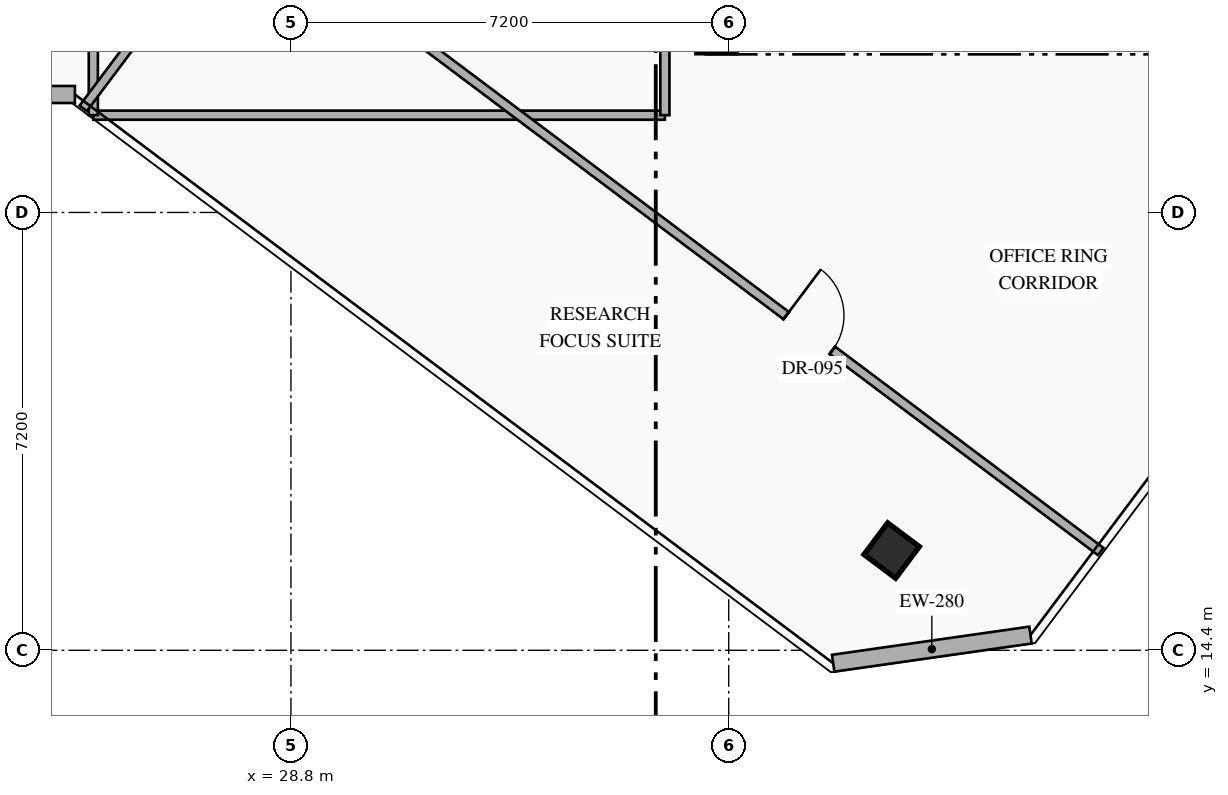
"""IFC4 building model, lengths in metres.
Left out: names, types, materials, properties, quantities, classifications, styles, units other than length and angle.
Written with IfcOpenShell. Run it as: python <this file> out.ifc"""

import sys

from ifc_helpers import new_model, si_unit, direction, frame, frame_2d, origin, origin_2d, place, context, subcontext, project, spatial, rectangle, hollow_rectangle, extrude, element, fill, save


model = new_model("IFC4")
c1 = context("Model", 3, precision=1e-05, world=origin(), true_north=direction((0.0, 1.0)))
c2 = subcontext(c1, "Body", "Model", "MODEL_VIEW")
j1 = project(units=[si_unit("LENGTHUNIT", "METRE"), si_unit("PLANEANGLEUNIT", "RADIAN")], contexts=[c1])
p1 = place(None, origin())
s1 = spatial("IfcSite", under=j1, at=p1, CompositionType="ELEMENT")
p2 = place(p1, origin())
s2 = spatial("IfcBuilding", under=s1, at=p2, CompositionType="ELEMENT")
p3 = place(p2, frame((0.0, 0.0, 239.55)))
s3 = spatial("IfcBuildingStorey", under=s2, at=p3, CompositionType="ELEMENT", Elevation=239.55)
for number, where, z_axis, x_axis in (
    (1, (35.8, 24.55, 0.0), (0.0, 0.0, 1.0), (1.0, 0.0, 0.0)),
    (2, (38.68, 16.04, 0.0), (0.0, 0.0, 1.0), (0.8, -0.6, 0.0)),
):
    element("IfcColumn", number, at=place(p3, frame(where, z_axis=z_axis, x_axis=x_axis)), inside=s3, PredefinedType="COLUMN", context=c2, shape_type="SweptSolid", body=[
        extrude(hollow_rectangle(XDim=0.65, YDim=0.65, WallThickness=0.025, at=origin_2d()), origin(), (0.0, 0.0, 1.0), 3.6),
    ])
p4 = place(p3, frame((40.963, 14.65, 0.0), z_axis=(0.0, 0.0, 1.0), x_axis=(-0.989977778067, -0.141223223777, 0.0)))
e3 = element("IfcWall", 3, at=p4, inside=s3, PredefinedType="STANDARD", context=c2, shape_type="SweptSolid", body=[
    extrude(rectangle(XDim=3.278, YDim=0.28, at=frame_2d((1.639, 0.0))), origin(), (0.0, 0.0, 1.0), 3.35),
])
p5 = place(p3, frame((25.247, 23.54, 0.0), z_axis=(0.0, 0.0, 1.0), x_axis=(-1.0, 0.0, 0.0)))
e4 = element("IfcWall", 4, at=p5, inside=s3, PredefinedType="STANDARD", context=c2, shape_type="SweptSolid", body=[
    extrude(rectangle(XDim=4.789, YDim=0.28, at=frame_2d((2.395, 0.0))), origin(), (0.0, 0.0, 1.0), 3.35),
])
p6 = place(p3, frame((25.55, 23.2, 0.0), z_axis=(0.0, 0.0, 1.0), x_axis=(1.0, 0.0, 0.0)))
e5 = element("IfcWall", 5, at=p6, inside=s3, PredefinedType="PARTITIONING", context=c2, shape_type="SweptSolid", body=[
    extrude(rectangle(XDim=9.4, YDim=0.15, at=frame_2d((4.7, 0.0))), origin(), (0.0, 0.0, 1.0), 3.35),
])
p7 = place(p3, frame((25.55, 23.2, 0.0), z_axis=(0.0, 0.0, 1.0), x_axis=(0.0, 1.0, 0.0)))
e6 = element("IfcWall", 6, at=p7, inside=s3, PredefinedType="PARTITIONING", context=c2, shape_type="SweptSolid", body=[
    extrude(rectangle(XDim=7.15, YDim=0.15, at=frame_2d((3.575, 0.0))), origin(), (0.0, 0.0, 1.0), 2.757),
])
p8 = place(p3, frame((34.95, 23.2, 0.0), z_axis=(0.0, 0.0, 1.0), x_axis=(0.0, 1.0, 0.0)))
e7 = element("IfcWall", 7, at=p8, inside=s3, PredefinedType="PARTITIONING", context=c2, shape_type="SweptSolid", body=[
    extrude(rectangle(XDim=7.15, YDim=0.15, at=frame_2d((3.575, 0.0))), origin(), (0.0, 0.0, 1.0), 3.35),
])
p9 = place(p3, frame((27.91, 26.68, 0.0), z_axis=(0.0, 0.0, 1.0), x_axis=(0.8, -0.6, 0.0)))
e8 = element("IfcWall", 8, at=p9, inside=s3, PredefinedType="PARTITIONING", context=c2, shape_type="SweptSolid", body=[
    extrude(rectangle(XDim=17.76, YDim=0.15, at=frame_2d((8.88, 0.0))), origin(), (0.0, 0.0, 1.0), 3.35),
])
p10 = place(p9, frame((11.294, 0.0, 0.0)))
e9 = element("IfcOpeningElement", 9, at=p10, cuts=e8, PredefinedType="OPENING", context=c2, shape_type="SweptSolid", body=[
    extrude(rectangle(XDim=0.95, YDim=2.15, at=frame_2d((0.475, 1.075))), frame((0.0, 0.085, 0.0), z_axis=(0.0, -1.0, 0.0), x_axis=(1.0, 0.0, 0.0)), (0.0, 0.0, 1.0), 0.17),
])
p11 = place(p3, frame((25.384, 23.312, 0.0), z_axis=(0.0, 0.0, 1.0), x_axis=(0.599990721155, 0.80000695905, 0.0)))
e10 = element("IfcWall", 10, at=p11, inside=s3, PredefinedType="PARTITIONING", context=c2, shape_type="SweptSolid", body=[
    extrude(rectangle(XDim=4.21, YDim=0.15, at=frame_2d((2.105, 0.0))), origin(), (0.0, 0.0, 1.0), 3.35),
])
p12 = place(p10, origin())
e11 = element("IfcDoor", 11, at=p12, inside=s3, OperationType="SINGLE_SWING_LEFT", PredefinedType="DOOR", context=c2, shape_type="SweptSolid", body=[
    extrude(rectangle(XDim=0.95, YDim=2.15, at=frame_2d((0.475, 1.075))), frame((0.0, 0.025, 0.0), z_axis=(0.0, -1.0, 0.0), x_axis=(1.0, 0.0, 0.0)), (0.0, 0.0, 1.0), 0.05),
])
fill(e9, e11)
save(model, sys.argv[1])
